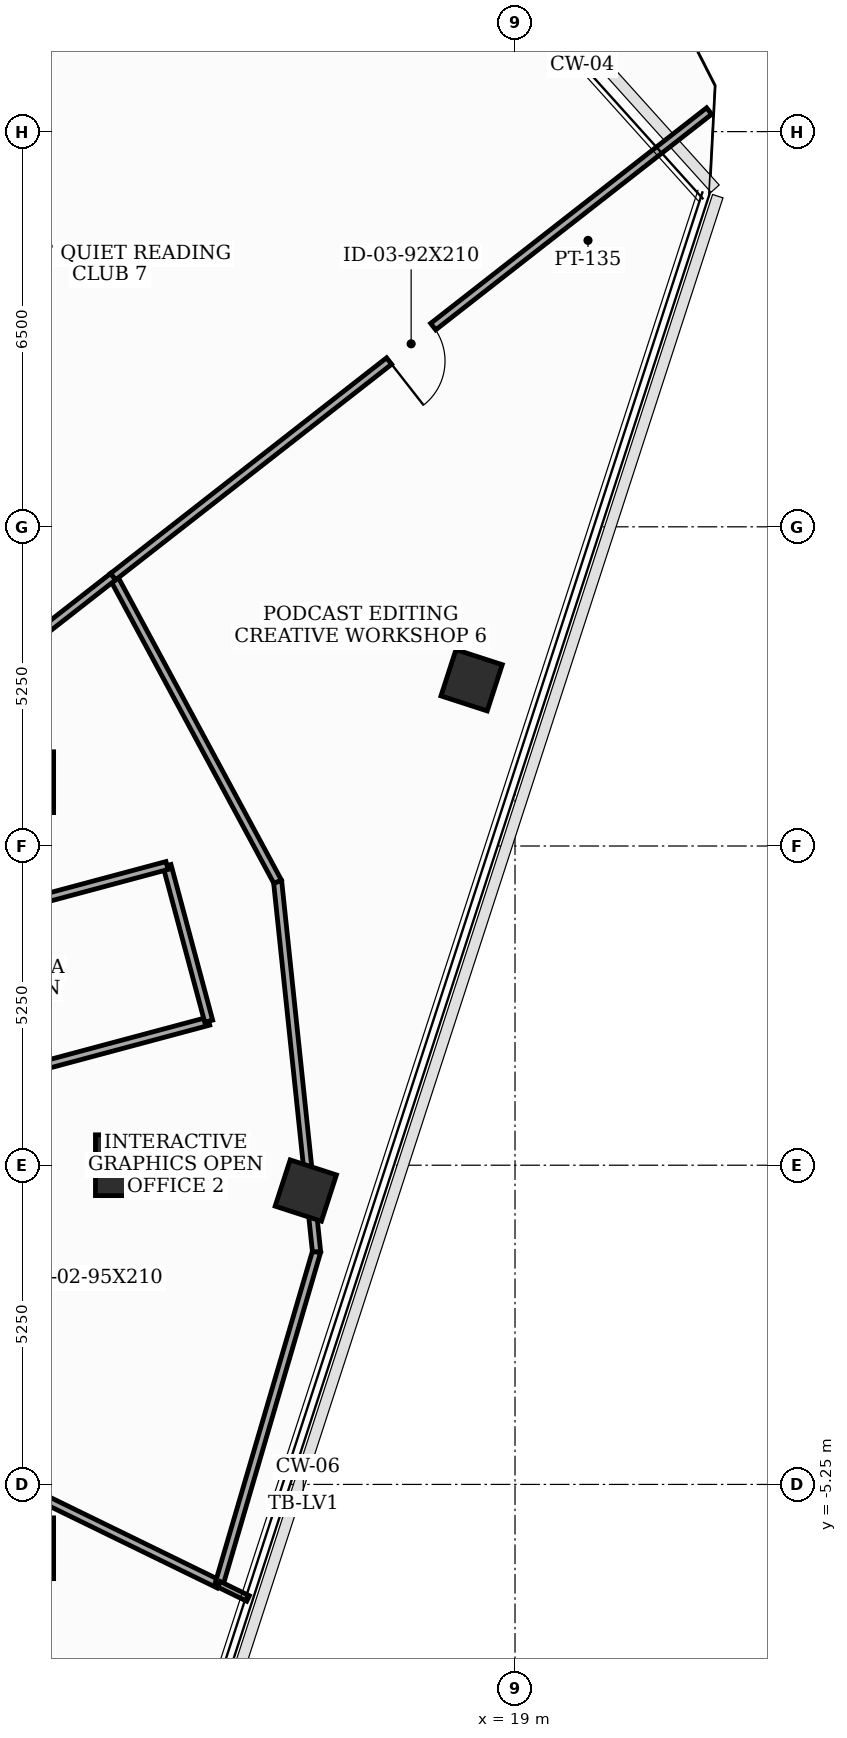
"""IFC4 building model, lengths in metres.
Left out: names, types, materials, properties, quantities, classifications, styles, units other than length and angle.
Written with IfcOpenShell. Run it as: python <this file> out.ifc"""

import sys

from ifc_helpers import new_model, si_unit, direction, frame, frame_2d, origin, origin_2d, place, context, subcontext, project, spatial, rectangle, extrude, element, fill, save


model = new_model("IFC4")
c1 = context("Model", 3, precision=1e-05, world=origin(), true_north=direction((0.0, 1.0)))
c2 = subcontext(c1, "Body", "Model", "MODEL_VIEW")
j1 = project(units=[si_unit("LENGTHUNIT", "METRE"), si_unit("PLANEANGLEUNIT", "RADIAN")], contexts=[c1])
p1 = place(None, origin())
s1 = spatial("IfcSite", under=j1, at=p1, CompositionType="ELEMENT")
p2 = place(p1, origin())
s2 = spatial("IfcBuilding", under=s1, at=p2, CompositionType="ELEMENT")
p3 = place(p2, frame((0.0, 0.0, 301.7)))
s3 = spatial("IfcBuildingStorey", under=s2, at=p3, CompositionType="ELEMENT", Elevation=301.7)
for number, where, z_axis, x_axis in (
    (1, (12.6, 0.0, 0.0), (0.0, 0.0, 1.0), (1.0, 0.0, 0.0)),
    (2, (10.912, 6.3, 0.0), (0.0, 0.0, 1.0), (1.0, 0.0, 0.0)),
    (3, (10.912, -6.3, 0.0), (0.0, 0.0, 1.0), (1.0, 0.0, 0.0)),
):
    element("IfcColumn", number, at=place(p3, frame(where, z_axis=z_axis, x_axis=x_axis)), inside=s3, PredefinedType="COLUMN", context=c2, shape_type="SweptSolid", body=[
        extrude(rectangle(XDim=1.0, YDim=1.0, at=origin_2d()), origin(), (0.0, 0.0, 1.0), 3.7),
    ])
for number, where, z_axis, x_axis in (
    (4, (15.559, -0.417, 0.0), (0.0, 0.0, 1.0), (0.309, 0.951, 0.0)),
    (5, (18.286, 7.976, 0.0), (0.0, 0.0, 1.0), (0.309, 0.951, 0.0)),
):
    element("IfcColumn", number, at=place(p3, frame(where, z_axis=z_axis, x_axis=x_axis)), inside=s3, PredefinedType="COLUMN", context=c2, shape_type="SweptSolid", body=[
        extrude(rectangle(XDim=0.8, YDim=0.8, at=origin_2d()), origin(), (0.0, 0.0, 1.0), 3.7),
    ])
p4 = place(p3, frame((10.65, 1.482, 0.0), z_axis=(0.0, 0.0, 1.0), x_axis=(0.965961397105, 0.2586862565, 0.0)))
e6 = element("IfcWall", 6, at=p4, inside=s3, PredefinedType="PARTITIONING", context=c2, shape_type="SweptSolid", body=[
    extrude(rectangle(XDim=3.429, YDim=0.135, at=frame_2d((1.714, 0.0))), origin(), (0.0, 0.0, 1.0), 2.885),
])
p5 = place(p3, frame((13.962, 2.369, 0.0), z_axis=(0.0, 0.0, 1.0), x_axis=(-0.258413725385, 0.966034340245, 0.0)))
e7 = element("IfcWall", 7, at=p5, inside=s3, PredefinedType="PARTITIONING", context=c2, shape_type="SweptSolid", body=[
    extrude(rectangle(XDim=2.65, YDim=0.135, at=frame_2d((1.325, 0.0))), origin(), (0.0, 0.0, 1.0), 3.5),
])
p6 = place(p3, frame((13.277, 4.929, 0.0), z_axis=(0.0, 0.0, 1.0), x_axis=(-0.965934830229, -0.258785439601, 0.0)))
e8 = element("IfcWall", 8, at=p6, inside=s3, PredefinedType="PARTITIONING", context=c2, shape_type="SweptSolid", body=[
    extrude(rectangle(XDim=2.72, YDim=0.135, at=frame_2d((1.36, 0.0))), origin(), (0.0, 0.0, 1.0), 2.885),
])
p7 = place(p3, frame((10.65, -5.194, 0.0), z_axis=(0.0, 0.0, 1.0), x_axis=(0.898781159743, -0.438397567159, 0.0)))
e9 = element("IfcWall", 9, at=p7, inside=s3, PredefinedType="PARTITIONING", context=c2, shape_type="SweptSolid", body=[
    extrude(rectangle(XDim=3.875, YDim=0.135, at=frame_2d((1.938, 0.0))), origin(), (0.0, 0.0, 1.0), 2.885),
])
p8 = place(p3, frame((14.133, -6.893, 0.0), z_axis=(0.0, 0.0, 1.0), x_axis=(0.281231672123, 0.959639904649, 0.0)))
e10 = element("IfcWall", 10, at=p8, inside=s3, PredefinedType="PARTITIONING", context=c2, shape_type="SweptSolid", body=[
    extrude(rectangle(XDim=5.7, YDim=0.135, at=frame_2d((2.85, 0.0))), origin(), (0.0, 0.0, 1.0), 3.5),
])
p9 = place(p3, frame((15.736, -1.423, 0.0), z_axis=(0.0, 0.0, 1.0), x_axis=(-0.104601717472, 0.994514193313, 0.0)))
e11 = element("IfcWall", 11, at=p9, inside=s3, PredefinedType="PARTITIONING", context=c2, shape_type="SweptSolid", body=[
    extrude(rectangle(XDim=6.12, YDim=0.135, at=frame_2d((3.06, 0.0))), origin(), (0.0, 0.0, 1.0), 3.035),
])
p10 = place(p3, frame((15.096, 4.663, 0.0), z_axis=(0.0, 0.0, 1.0), x_axis=(-0.474498198469, 0.88025647379, 0.0)))
e12 = element("IfcWall", 12, at=p10, inside=s3, PredefinedType="PARTITIONING", context=c2, shape_type="SweptSolid", body=[
    extrude(rectangle(XDim=5.7, YDim=0.135, at=frame_2d((2.85, 0.0))), origin(), (0.0, 0.0, 1.0), 3.035),
])
p11 = place(p3, frame((12.391, 9.681, 0.0), z_axis=(0.0, 0.0, 1.0), x_axis=(-0.788124883644, -0.615515367624, 0.0)))
e13 = element("IfcWall", 13, at=p11, inside=s3, PredefinedType="PARTITIONING", context=c2, shape_type="SweptSolid", body=[
    extrude(rectangle(XDim=2.209, YDim=0.135, at=frame_2d((1.104, 0.0))), origin(), (0.0, 0.0, 1.0), 3.5),
])
p12 = place(p3, frame((14.609, -7.126, 0.0), z_axis=(0.0, 0.0, 1.0), x_axis=(-0.898533726223, 0.438904480313, 0.0)))
e14 = element("IfcWall", 14, at=p12, inside=s3, PredefinedType="MOVABLE", context=c2, shape_type="SweptSolid", body=[
    extrude(rectangle(XDim=0.53, YDim=0.1, at=frame_2d((0.265, 0.0))), origin(), (0.0, 0.0, 1.0), 3.5),
])
p13 = place(p3, frame((22.192, 17.338, 0.0), z_axis=(0.0, 0.0, 1.0), x_axis=(-0.788015446076, -0.615655469192, 0.0)))
e15 = element("IfcWall", 15, at=p13, inside=s3, PredefinedType="PARTITIONING", context=c2, shape_type="SweptSolid", body=[
    extrude(rectangle(XDim=12.438, YDim=0.135, at=frame_2d((6.219, 0.0))), origin(), (0.0, 0.0, 1.0), 3.035),
])
p14 = place(p13, frame((5.759, 0.0, 0.0)))
e16 = element("IfcOpeningElement", 16, at=p14, cuts=e15, PredefinedType="OPENING", context=c2, shape_type="SweptSolid", body=[
    extrude(rectangle(XDim=0.92, YDim=2.1, at=frame_2d((0.46, 1.05))), frame((0.0, 0.077, 0.0), z_axis=(0.0, -1.0, 0.0), x_axis=(1.0, 0.0, 0.0)), (0.0, 0.0, 1.0), 0.155),
])
p15 = place(p14, origin())
e17 = element("IfcDoor", 17, at=p15, inside=s3, OperationType="SINGLE_SWING_RIGHT", PredefinedType="DOOR", context=c2, shape_type="SweptSolid", body=[
    extrude(rectangle(XDim=0.92, YDim=2.1, at=frame_2d((0.46, 1.05))), frame((0.0, 0.025, 0.0), z_axis=(0.0, -1.0, 0.0), x_axis=(1.0, 0.0, 0.0)), (0.0, 0.0, 1.0), 0.05),
])
fill(e16, e17)
save(model, sys.argv[1])
